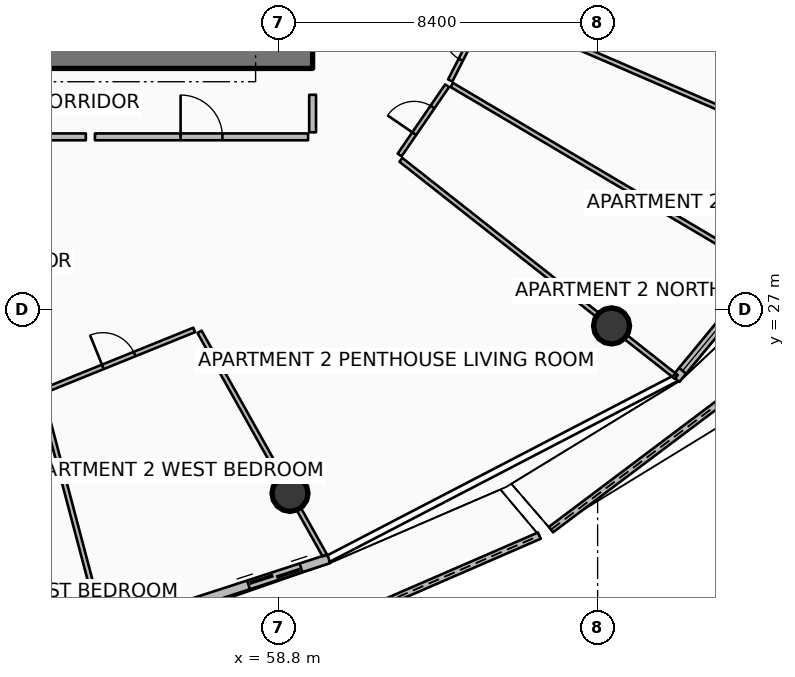
"""IFC4 building model, lengths in metres.
Left out: names, types, materials, properties, quantities, classifications, styles, units other than length and angle.
Written with IfcOpenShell. Run it as: python <this file> out.ifc"""

import sys

from ifc_helpers import new_model, si_unit, direction, frame, frame_2d, origin, origin_2d, place, context, subcontext, project, spatial, polyline, rectangle, circle, outline, extrude, element, fill, save


model = new_model("IFC4")
c1 = context("Model", 3, precision=1e-05, world=origin(), true_north=direction((0.0, 1.0)))
c2 = subcontext(c1, "Body", "Model", "MODEL_VIEW")
j1 = project(units=[si_unit("LENGTHUNIT", "METRE"), si_unit("PLANEANGLEUNIT", "RADIAN")], contexts=[c1])
p1 = place(None, origin())
s1 = spatial("IfcSite", under=j1, at=p1, CompositionType="ELEMENT")
p2 = place(p1, origin())
s2 = spatial("IfcBuilding", under=s1, at=p2, CompositionType="ELEMENT")
p3 = place(p2, frame((0.0, 0.0, 271.35)))
s3 = spatial("IfcBuildingStorey", under=s2, at=p3, CompositionType="ELEMENT", Elevation=271.35)
p4 = place(p3, frame((49.95, 33.675, 0.0), z_axis=(0.0, 0.0, 1.0), x_axis=(1.0, 0.0, 0.0)))
e1 = element("IfcWall", 1, at=p4, inside=s3, PredefinedType="SHEAR", context=c2, shape_type="SweptSolid", body=[
    extrude(rectangle(XDim=9.75, YDim=0.65, at=frame_2d((4.875, 0.0))), origin(), (0.0, 0.0, 1.0), 3.85),
])
for number, where, z_axis, x_axis in (
    (2, (59.105, 22.17, 0.0), (0.0, 0.0, 1.0), (1.0, 0.0, 0.0)),
    (3, (67.566, 26.575, 0.0), (0.0, 0.0, 1.0), (1.0, 0.0, 0.0)),
):
    element("IfcColumn", number, at=place(p3, frame(where, z_axis=z_axis, x_axis=x_axis)), inside=s3, PredefinedType="COLUMN", context=c2, shape_type="SweptSolid", body=[
        extrude(circle(Radius=0.475, at=origin_2d()), origin(), (0.0, 0.0, 1.0), 3.59),
    ])
p5 = place(p3, frame((56.257, 16.974, 0.0), z_axis=(0.0, 0.0, 1.0), x_axis=(0.917372888721, 0.398028872119, 0.0)))
e4 = element("IfcWall", 4, at=p5, inside=s3, PredefinedType="PARAPET", context=c2, shape_type="SweptSolid", body=[
    extrude(outline(polyline([(0.0, 0.0), (10.258, 0.0), (10.257, 1.12), (5.129, 1.182), (0.0, 1.348), (0.0, 0.0)])), frame((0.0, 0.09, 0.0), z_axis=(0.0, -1.0, 0.0), x_axis=(1.0, 0.0, 0.0)), (0.0, 0.0, 1.0), 0.18),
])
p6 = place(p3, frame((65.972, 21.216, 0.0), z_axis=(0.0, 0.0, 1.0), x_axis=(0.799146815098, 0.601135898046, 0.0)))
e5 = element("IfcWall", 5, at=p6, inside=s3, PredefinedType="PARAPET", context=c2, shape_type="SweptSolid", body=[
    extrude(outline(polyline([(0.0, 0.0), (11.411, 0.0), (11.411, 1.348), (5.706, 1.182), (0.0, 1.12), (0.0, 0.0)])), frame((0.0, 0.09, 0.0), z_axis=(0.0, -1.0, 0.0), x_axis=(1.0, 0.0, 0.0)), (0.0, 0.0, 1.0), 0.18),
])
p7 = place(p3, frame((50.858, 17.436, 0.0), z_axis=(0.0, 0.0, 1.0), x_axis=(0.951055974609, 0.309018661507, 0.0)))
e6 = element("IfcWall", 6, at=p7, inside=s3, PredefinedType="SOLIDWALL", context=c2, shape_type="SweptSolid", body=[
    extrude(rectangle(XDim=9.745, YDim=0.24, at=frame_2d((4.873, 0.0))), origin(), (0.0, 0.0, 1.0), 2.54),
])
p8 = place(p7, frame((7.525, 0.0, 0.0)))
e7 = element("IfcOpeningElement", 7, at=p8, cuts=e6, PredefinedType="OPENING", context=c2, shape_type="SweptSolid", body=[
    extrude(rectangle(XDim=1.45, YDim=2.15, at=frame_2d((0.725, 1.075))), frame((0.0, 0.13, 0.0), z_axis=(0.0, -1.0, 0.0), x_axis=(1.0, 0.0, 0.0)), (0.0, 0.0, 1.0), 0.26),
])
p9 = place(p7, frame((0.28, 0.0, 0.65)))
e8 = element("IfcOpeningElement", 8, at=p9, cuts=e6, PredefinedType="OPENING", context=c2, shape_type="SweptSolid", body=[
    extrude(rectangle(XDim=1.6, YDim=1.5, at=frame_2d((0.8, 0.75))), frame((0.0, 0.13, 0.0), z_axis=(0.0, -1.0, 0.0), x_axis=(1.0, 0.0, 0.0)), (0.0, 0.0, 1.0), 0.26),
])
p10 = place(p3, frame((69.258, 25.178, 0.0), z_axis=(0.0, 0.0, 1.0), x_axis=(0.636680093065, 0.771128043255, 0.0)))
e9 = element("IfcWall", 9, at=p10, inside=s3, PredefinedType="SOLIDWALL", context=c2, shape_type="SweptSolid", body=[
    extrude(rectangle(XDim=11.438, YDim=0.24, at=frame_2d((5.719, 0.0))), origin(), (0.0, 0.0, 1.0), 2.54),
])
p11 = place(p10, frame((9.218, 0.0, 0.0)))
e10 = element("IfcOpeningElement", 10, at=p11, cuts=e9, PredefinedType="OPENING", context=c2, shape_type="SweptSolid", body=[
    extrude(rectangle(XDim=1.45, YDim=2.15, at=frame_2d((0.725, 1.075))), frame((0.0, 0.13, 0.0), z_axis=(0.0, -1.0, 0.0), x_axis=(1.0, 0.0, 0.0)), (0.0, 0.0, 1.0), 0.26),
])
p12 = place(p10, frame((0.28, 0.0, 0.65)))
e11 = element("IfcOpeningElement", 11, at=p12, cuts=e9, PredefinedType="OPENING", context=c2, shape_type="SweptSolid", body=[
    extrude(rectangle(XDim=1.6, YDim=1.5, at=frame_2d((0.8, 0.75))), frame((0.0, 0.13, 0.0), z_axis=(0.0, -1.0, 0.0), x_axis=(1.0, 0.0, 0.0)), (0.0, 0.0, 1.0), 0.26),
])
p13 = place(p3, frame((53.972, 31.55, 0.0), z_axis=(0.0, 0.0, 1.0), x_axis=(1.0, 0.0, 0.0)))
e12 = element("IfcWall", 12, at=p13, inside=s3, PredefinedType="PARTITIONING", context=c2, shape_type="SweptSolid", body=[
    extrude(rectangle(XDim=5.608, YDim=0.18, at=frame_2d((2.804, 0.0))), origin(), (0.0, 0.0, 1.0), 2.957),
])
p14 = place(p13, frame((2.254, 0.0, 0.0)))
e13 = element("IfcOpeningElement", 13, at=p14, cuts=e12, PredefinedType="OPENING", context=c2, shape_type="SweptSolid", body=[
    extrude(rectangle(XDim=1.1, YDim=2.1, at=frame_2d((0.55, 1.05))), frame((0.0, 0.1, 0.0), z_axis=(0.0, -1.0, 0.0), x_axis=(1.0, 0.0, 0.0)), (0.0, 0.0, 1.0), 0.2),
])
p15 = place(p3, frame((59.7, 31.67, 0.0), z_axis=(0.0, 0.0, 1.0), x_axis=(0.0, 1.0, 0.0)))
e14 = element("IfcWall", 14, at=p15, inside=s3, PredefinedType="PARTITIONING", context=c2, shape_type="SweptSolid", body=[
    extrude(rectangle(XDim=0.987, YDim=0.18, at=frame_2d((0.493, 0.0))), origin(), (0.0, 0.0, 1.0), 2.957),
])
p16 = place(p3, frame((49.357, 31.55, 0.0), z_axis=(0.0, 0.0, 1.0), x_axis=(1.0, 0.0, 0.0)))
e15 = element("IfcWall", 15, at=p16, inside=s3, PredefinedType="PARTITIONING", context=c2, shape_type="SweptSolid", body=[
    extrude(rectangle(XDim=4.376, YDim=0.18, at=frame_2d((2.188, 0.0))), origin(), (0.0, 0.0, 1.0), 2.957),
])
p17 = place(p3, frame((56.725, 26.42, 0.0), z_axis=(0.0, 0.0, 1.0), x_axis=(0.488624332812, -0.872494275846, 0.0)))
e16 = element("IfcWall", 16, at=p17, inside=s3, PredefinedType="PARTITIONING", context=c2, shape_type="SweptSolid", body=[
    extrude(rectangle(XDim=6.738, YDim=0.125, at=frame_2d((3.369, 0.0))), origin(), (0.0, 0.0, 1.0), 2.957),
])
p18 = place(p3, frame((52.56, 24.746, 0.0), z_axis=(0.0, 0.0, 1.0), x_axis=(0.255531000294, -0.966800862582, 0.0)))
e17 = element("IfcWall", 17, at=p18, inside=s3, PredefinedType="PARTITIONING", context=c2, shape_type="SweptSolid", body=[
    extrude(rectangle(XDim=6.311, YDim=0.125, at=frame_2d((3.155, 0.0))), origin(), (0.0, 0.0, 1.0), 3.03),
])
p19 = place(p3, frame((52.612, 24.863, 0.0), z_axis=(0.0, 0.0, 1.0), x_axis=(0.927015680649, 0.375022569762, 0.0)))
e18 = element("IfcWall", 18, at=p19, inside=s3, PredefinedType="PARTITIONING", context=c2, shape_type="SweptSolid", body=[
    extrude(rectangle(XDim=4.285, YDim=0.125, at=frame_2d((2.143, 0.0))), origin(), (0.0, 0.0, 1.0), 2.957),
])
p20 = place(p19, frame((1.692, 0.0, 0.0)))
e19 = element("IfcOpeningElement", 19, at=p20, cuts=e18, PredefinedType="OPENING", context=c2, shape_type="SweptSolid", body=[
    extrude(rectangle(XDim=0.9, YDim=2.08, at=frame_2d((0.45, 1.04))), frame((0.0, 0.073, 0.0), z_axis=(0.0, -1.0, 0.0), x_axis=(1.0, 0.0, 0.0)), (0.0, 0.0, 1.0), 0.145),
])
p21 = place(p3, frame((62.023, 30.945, 0.0), z_axis=(0.0, 0.0, 1.0), x_axis=(0.785322102606, -0.619087388952, 0.0)))
e20 = element("IfcWall", 20, at=p21, inside=s3, PredefinedType="PARTITIONING", context=c2, shape_type="SweptSolid", body=[
    extrude(rectangle(XDim=9.228, YDim=0.125, at=frame_2d((4.614, 0.0))), origin(), (0.0, 0.0, 1.0), 2.957),
])
p22 = place(p3, frame((63.362, 32.915, 0.0), z_axis=(0.0, 0.0, 1.0), x_axis=(0.860726173163, -0.509068222178, 0.0)))
e21 = element("IfcWall", 21, at=p22, inside=s3, PredefinedType="PARTITIONING", context=c2, shape_type="SweptSolid", body=[
    extrude(rectangle(XDim=9.464, YDim=0.125, at=frame_2d((4.732, 0.0))), origin(), (0.0, 0.0, 1.0), 3.03),
])
p23 = place(p3, frame((64.379, 34.912, 0.0), z_axis=(0.0, 0.0, 1.0), x_axis=(0.917754922423, -0.397147204912, 0.0)))
e22 = element("IfcWall", 22, at=p23, inside=s3, PredefinedType="PARTITIONING", context=c2, shape_type="SweptSolid", body=[
    extrude(rectangle(XDim=10.243, YDim=0.125, at=frame_2d((5.122, 0.0))), origin(), (0.0, 0.0, 1.0), 3.03),
])
p24 = place(p3, frame((61.99, 31.073, 0.0), z_axis=(0.0, 0.0, 1.0), x_axis=(0.565365127096, 0.824840756185, 0.0)))
e23 = element("IfcWall", 23, at=p24, inside=s3, PredefinedType="PARTITIONING", context=c2, shape_type="SweptSolid", body=[
    extrude(rectangle(XDim=2.209, YDim=0.125, at=frame_2d((1.104, 0.0))), origin(), (0.0, 0.0, 1.0), 2.957),
])
p25 = place(p24, frame((0.68, 0.0, 0.0)))
e24 = element("IfcOpeningElement", 24, at=p25, cuts=e23, PredefinedType="OPENING", context=c2, shape_type="SweptSolid", body=[
    extrude(rectangle(XDim=0.85, YDim=2.06, at=frame_2d((0.425, 1.03))), frame((0.0, 0.073, 0.0), z_axis=(0.0, -1.0, 0.0), x_axis=(1.0, 0.0, 0.0)), (0.0, 0.0, 1.0), 0.145),
])
p26 = place(p3, frame((63.321, 33.032, 0.0), z_axis=(0.0, 0.0, 1.0), x_axis=(0.453994690579, 0.891004388837, 0.0)))
e25 = element("IfcWall", 25, at=p26, inside=s3, PredefinedType="PARTITIONING", context=c2, shape_type="SweptSolid", body=[
    extrude(rectangle(XDim=2.07, YDim=0.125, at=frame_2d((1.035, 0.0))), origin(), (0.0, 0.0, 1.0), 3.03),
])
p27 = place(p26, frame((0.61, 0.0, 0.0)))
e26 = element("IfcOpeningElement", 26, at=p27, cuts=e25, PredefinedType="OPENING", context=c2, shape_type="SweptSolid", body=[
    extrude(rectangle(XDim=0.85, YDim=2.06, at=frame_2d((0.425, 1.03))), frame((0.0, 0.073, 0.0), z_axis=(0.0, -1.0, 0.0), x_axis=(1.0, 0.0, 0.0)), (0.0, 0.0, 1.0), 0.145),
])
p28 = place(p8, origin())
e27 = element("IfcDoor", 27, at=p28, inside=s3, OperationType="DOUBLE_DOOR_SLIDING", PredefinedType="DOOR", context=c2, shape_type="SweptSolid", body=[
    extrude(rectangle(XDim=1.45, YDim=2.15, at=frame_2d((0.725, 1.075))), frame((0.0, 0.025, 0.0), z_axis=(0.0, -1.0, 0.0), x_axis=(1.0, 0.0, 0.0)), (0.0, 0.0, 1.0), 0.05),
])
fill(e7, e27)
p29 = place(p12, origin())
e28 = element("IfcWindow", 28, at=p29, inside=s3, PartitioningType="SINGLE_PANEL", PredefinedType="WINDOW", context=c2, shape_type="SweptSolid", body=[
    extrude(rectangle(XDim=1.6, YDim=1.5, at=frame_2d((0.8, 0.75))), frame((0.0, 0.03, 0.0), z_axis=(0.0, -1.0, 0.0), x_axis=(1.0, 0.0, 0.0)), (0.0, 0.0, 1.0), 0.06),
])
fill(e11, e28)
p30 = place(p14, origin())
e29 = element("IfcDoor", 29, at=p30, inside=s3, OperationType="SINGLE_SWING_LEFT", PredefinedType="DOOR", context=c2, shape_type="SweptSolid", body=[
    extrude(rectangle(XDim=1.1, YDim=2.1, at=frame_2d((0.55, 1.05))), frame((0.0, 0.025, 0.0), z_axis=(0.0, -1.0, 0.0), x_axis=(1.0, 0.0, 0.0)), (0.0, 0.0, 1.0), 0.05),
])
fill(e13, e29)
p31 = place(p20, origin())
e30 = element("IfcDoor", 30, at=p31, inside=s3, OperationType="SINGLE_SWING_LEFT", PredefinedType="DOOR", context=c2, shape_type="SweptSolid", body=[
    extrude(rectangle(XDim=0.9, YDim=2.08, at=frame_2d((0.45, 1.04))), frame((0.0, 0.025, 0.0), z_axis=(0.0, -1.0, 0.0), x_axis=(1.0, 0.0, 0.0)), (0.0, 0.0, 1.0), 0.05),
])
fill(e19, e30)
p32 = place(p25, origin())
e31 = element("IfcDoor", 31, at=p32, inside=s3, OperationType="SINGLE_SWING_LEFT", PredefinedType="DOOR", context=c2, shape_type="SweptSolid", body=[
    extrude(rectangle(XDim=0.85, YDim=2.06, at=frame_2d((0.425, 1.03))), frame((0.0, 0.025, 0.0), z_axis=(0.0, -1.0, 0.0), x_axis=(1.0, 0.0, 0.0)), (0.0, 0.0, 1.0), 0.05),
])
fill(e24, e31)
p33 = place(p27, origin())
e32 = element("IfcDoor", 32, at=p33, inside=s3, OperationType="SINGLE_SWING_RIGHT", PredefinedType="DOOR", context=c2, shape_type="SweptSolid", body=[
    extrude(rectangle(XDim=0.85, YDim=2.06, at=frame_2d((0.425, 1.03))), frame((0.0, 0.025, 0.0), z_axis=(0.0, -1.0, 0.0), x_axis=(1.0, 0.0, 0.0)), (0.0, 0.0, 1.0), 0.05),
])
fill(e26, e32)
save(model, sys.argv[1])
